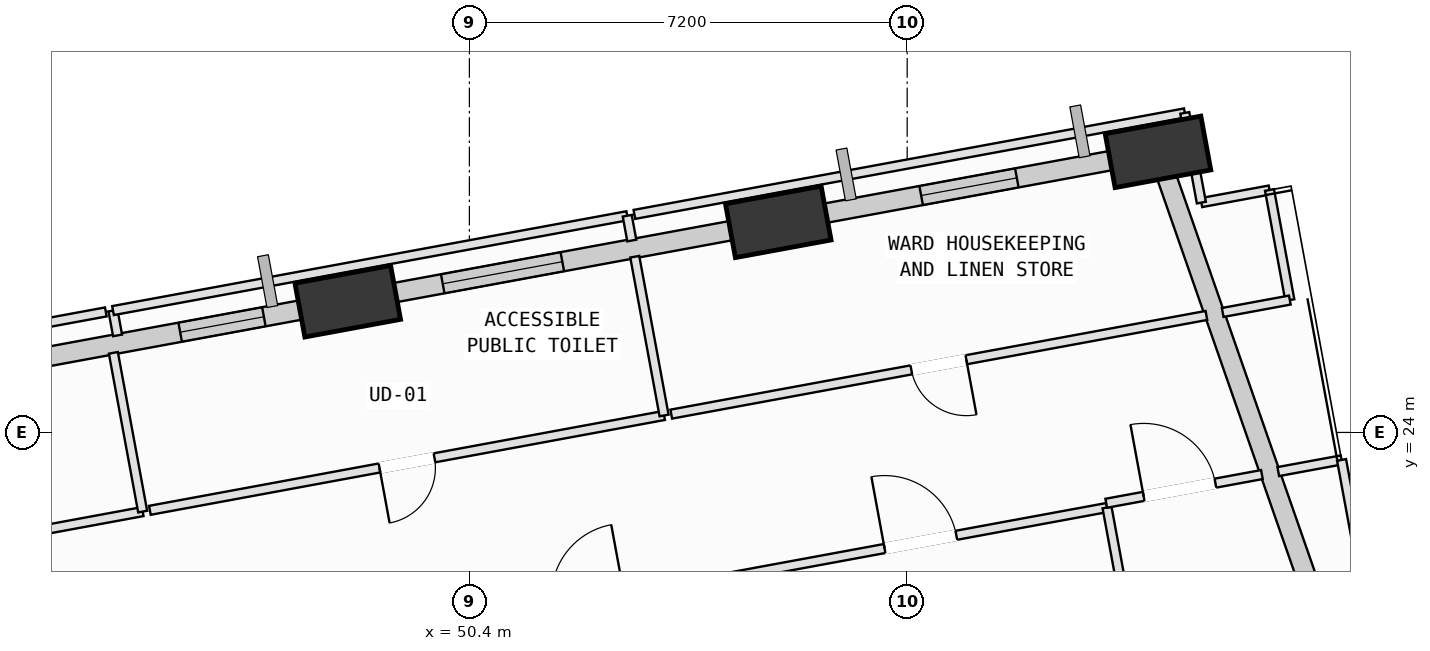
"""IFC4 building model, lengths in metres.
Left out: names, types, materials, properties, quantities, classifications, styles, units other than length and angle.
Written with IfcOpenShell. Run it as: python <this file> out.ifc"""

import sys

from ifc_helpers import new_model, si_unit, direction, frame, frame_2d, origin, origin_2d, place, context, subcontext, project, spatial, rectangle, extrude, element, fill, save


model = new_model("IFC4")
c1 = context("Model", 3, precision=1e-05, world=origin(), true_north=direction((0.0, 1.0)))
c2 = subcontext(c1, "Body", "Model", "MODEL_VIEW")
j1 = project(units=[si_unit("LENGTHUNIT", "METRE"), si_unit("PLANEANGLEUNIT", "RADIAN")], contexts=[c1])
p1 = place(None, origin())
s1 = spatial("IfcSite", under=j1, at=p1, CompositionType="ELEMENT")
p2 = place(p1, origin())
s2 = spatial("IfcBuilding", under=s1, at=p2, CompositionType="ELEMENT")
p3 = place(p2, frame((0.0, 0.0, 67.0)))
s3 = spatial("IfcBuildingStorey", under=s2, at=p3, CompositionType="ELEMENT", Elevation=67.0)
p4 = place(p3, frame((61.725, 28.615, 0.002), z_axis=(-0.0166839767, 0.115635125786, 0.993151631226), x_axis=(-0.947610989873, -0.31872301887, 0.021190778971)))
e1 = element("IfcColumn", 1, at=p4, inside=s3, PredefinedType="COLUMN", context=c2, shape_type="SweptSolid", body=[
    extrude(rectangle(XDim=1.6, YDim=0.9, at=origin_2d()), origin(), (0.0, 0.0, 1.0), 4.024),
])
p5 = place(p3, frame((55.48, 27.463, 0.002), z_axis=(-0.01174096619, 0.090216854196, 0.995852935394), x_axis=(-0.951879637857, -0.306027551893, 0.016501288293)))
e2 = element("IfcColumn", 2, at=p5, inside=s3, PredefinedType="COLUMN", context=c2, shape_type="SweptSolid", body=[
    extrude(rectangle(XDim=1.6, YDim=0.9, at=origin_2d()), origin(), (0.0, 0.0, 1.0), 4.013),
])
p6 = place(p3, frame((48.399, 26.157, 0.002), z_axis=(-0.006158157551, 0.061154772509, 0.998109298071), x_axis=(-0.960327160193, -0.278652944125, 0.011148189357)))
e3 = element("IfcColumn", 3, at=p6, inside=s3, PredefinedType="COLUMN", context=c2, shape_type="SweptSolid", body=[
    extrude(rectangle(XDim=1.6, YDim=0.9, at=origin_2d()), origin(), (0.0, 0.0, 1.0), 4.004),
])
p7 = place(p3, frame((61.848, 28.26, 0.0), z_axis=(0.0, 0.0, 1.0), x_axis=(0.329546090906, -0.944139488618, 0.0)))
e4 = element("IfcWall", 4, at=p7, inside=s3, PredefinedType="SOLIDWALL", context=c2, shape_type="SweptSolid", body=[
    extrude(rectangle(XDim=8.614, YDim=0.32, at=frame_2d((4.307, 0.0))), origin(), (0.0, 0.0, 1.0), 3.165),
])
p8 = place(p3, frame((56.06, 27.57, 0.0), z_axis=(0.0, 0.0, 1.0), x_axis=(0.983413832145, 0.181375948644, 0.0)))
e5 = element("IfcWall", 5, at=p8, inside=s3, PredefinedType="SOLIDWALL", context=c2, shape_type="SweptSolid", body=[
    extrude(rectangle(XDim=5.209, YDim=0.32, at=frame_2d((2.604, 0.0))), origin(), (0.0, 0.0, 1.0), 3.165),
])
p9 = place(p8, frame((1.8, 0.0, 0.75)))
e6 = element("IfcOpeningElement", 6, at=p9, cuts=e5, PredefinedType="OPENING", context=c2, shape_type="SweptSolid", body=[
    extrude(rectangle(XDim=1.6, YDim=1.95, at=frame_2d((0.8, 0.975))), frame((0.0, 0.17, 0.0), z_axis=(0.0, -1.0, 0.0), x_axis=(1.0, 0.0, 0.0)), (0.0, 0.0, 1.0), 0.34),
])
p10 = place(p3, frame((48.995, 26.267, 0.0), z_axis=(0.0, 0.0, 1.0), x_axis=(0.983410218869, 0.1813955386, 0.0)))
e7 = element("IfcWall", 7, at=p10, inside=s3, PredefinedType="SOLIDWALL", context=c2, shape_type="SweptSolid", body=[
    extrude(rectangle(XDim=6.024, YDim=0.32, at=frame_2d((3.012, 0.0))), origin(), (0.0, 0.0, 1.0), 3.165),
])
p11 = place(p10, frame((0.983, 0.0, 0.75)))
e8 = element("IfcOpeningElement", 8, at=p11, cuts=e7, PredefinedType="OPENING", context=c2, shape_type="SweptSolid", body=[
    extrude(rectangle(XDim=2.0, YDim=1.95, at=frame_2d((1.0, 0.975))), frame((0.0, 0.17, 0.0), z_axis=(0.0, -1.0, 0.0), x_axis=(1.0, 0.0, 0.0)), (0.0, 0.0, 1.0), 0.34),
])
p12 = place(p3, frame((41.924, 24.962, 0.0), z_axis=(0.0, 0.0, 1.0), x_axis=(0.983415582056, 0.181366460431, 0.0)))
e9 = element("IfcWall", 9, at=p12, inside=s3, PredefinedType="SOLIDWALL", context=c2, shape_type="SweptSolid", body=[
    extrude(rectangle(XDim=6.0, YDim=0.32, at=frame_2d((3.0, 0.0))), origin(), (0.0, 0.0, 1.0), 3.165),
])
p13 = place(p12, frame((3.782, 0.0, 0.75)))
e10 = element("IfcOpeningElement", 10, at=p13, cuts=e9, PredefinedType="OPENING", context=c2, shape_type="SweptSolid", body=[
    extrude(rectangle(XDim=1.4, YDim=1.85, at=frame_2d((0.7, 0.925))), frame((0.0, 0.17, 0.0), z_axis=(0.0, -1.0, 0.0), x_axis=(1.0, 0.0, 0.0)), (0.0, 0.0, 1.0), 0.34),
])
p14 = place(p3, frame((54.75, 21.634, 0.0), z_axis=(0.0, 0.0, 1.0), x_axis=(0.983442731357, 0.181219188115, 0.0)))
e11 = element("IfcWall", 11, at=p14, inside=s3, PredefinedType="PARTITIONING", context=c2, shape_type="SweptSolid", body=[
    extrude(rectangle(XDim=6.24, YDim=0.15, at=frame_2d((3.12, 0.0))), origin(), (0.0, 0.0, 1.0), 3.78),
])
p15 = place(p14, frame((2.52, 0.0, 0.0)))
e12 = element("IfcOpeningElement", 12, at=p15, cuts=e11, PredefinedType="OPENING", context=c2, shape_type="SweptSolid", body=[
    extrude(rectangle(XDim=1.2, YDim=2.15, at=frame_2d((0.6, 1.075))), frame((0.0, 0.085, 0.0), z_axis=(0.0, -1.0, 0.0), x_axis=(1.0, 0.0, 0.0)), (0.0, 0.0, 1.0), 0.17),
])
p16 = place(p3, frame((60.887, 22.765, 0.0), z_axis=(0.0, 0.0, 1.0), x_axis=(0.181328083702, -0.983422658912, 0.0)))
e13 = element("IfcWall", 13, at=p16, inside=s3, PredefinedType="PARTITIONING", context=c2, shape_type="SweptSolid", body=[
    extrude(rectangle(XDim=15.529, YDim=0.15, at=frame_2d((7.765, 0.0))), origin(), (0.0, 0.0, 1.0), 3.78),
])
p17 = place(p3, frame((45.027, 22.698, 0.0), z_axis=(0.0, 0.0, 1.0), x_axis=(-0.983411242351, -0.181389989847, 0.0)))
e14 = element("IfcWall", 14, at=p17, inside=s3, PredefinedType="PARTITIONING", context=c2, shape_type="SweptSolid", body=[
    extrude(rectangle(XDim=8.165, YDim=0.15, at=frame_2d((4.082, 0.0))), origin(), (0.0, 0.0, 1.0), 3.78),
])
p18 = place(p17, frame((3.482, 0.0, 0.0)))
e15 = element("IfcOpeningElement", 15, at=p18, cuts=e14, PredefinedType="OPENING", context=c2, shape_type="SweptSolid", body=[
    extrude(rectangle(XDim=1.2, YDim=2.15, at=frame_2d((0.6, 1.075))), frame((0.0, 0.085, 0.0), z_axis=(0.0, -1.0, 0.0), x_axis=(1.0, 0.0, 0.0)), (0.0, 0.0, 1.0), 0.17),
])
p19 = place(p3, frame((36.392, 24.502, 0.0), z_axis=(0.0, 0.0, 1.0), x_axis=(0.983431589645, 0.181279641684, 0.0)))
e16 = element("IfcWall", 16, at=p19, inside=s3, PredefinedType="PARTITIONING", context=c2, shape_type="SweptSolid", body=[
    extrude(rectangle(XDim=8.164, YDim=0.15, at=frame_2d((4.082, 0.0))), origin(), (0.0, 0.0, 1.0), 3.165),
])
p20 = place(p3, frame((44.545, 25.309, 0.0), z_axis=(0.0, 0.0, 1.0), x_axis=(0.181595357351, -0.983373340186, 0.0)))
e17 = element("IfcWall", 17, at=p20, inside=s3, PredefinedType="PARTITIONING", context=c2, shape_type="SweptSolid", body=[
    extrude(rectangle(XDim=2.655, YDim=0.15, at=frame_2d((1.328, 0.0))), origin(), (0.0, 0.0, 1.0), 3.78),
])
p21 = place(p3, frame((53.602, 24.279, 0.0), z_axis=(0.0, 0.0, 1.0), x_axis=(-0.983407902238, -0.181408097439, 0.0)))
e18 = element("IfcWall", 18, at=p21, inside=s3, PredefinedType="PARTITIONING", context=c2, shape_type="SweptSolid", body=[
    extrude(rectangle(XDim=8.6, YDim=0.15, at=frame_2d((4.3, 0.0))), origin(), (0.0, 0.0, 1.0), 3.78),
])
p22 = place(p21, frame((3.84, 0.0, 0.0)))
e19 = element("IfcOpeningElement", 19, at=p22, cuts=e18, PredefinedType="OPENING", context=c2, shape_type="SweptSolid", body=[
    extrude(rectangle(XDim=0.92, YDim=2.1, at=frame_2d((0.46, 1.05))), frame((0.0, 0.085, 0.0), z_axis=(0.0, -1.0, 0.0), x_axis=(1.0, 0.0, 0.0)), (0.0, 0.0, 1.0), 0.17),
])
p23 = place(p3, frame((44.614, 25.596, 0.0), z_axis=(0.0, 0.0, 1.0), x_axis=(-0.180698000463, 0.983538627929, 0.0)))
e20 = element("IfcWall", 20, at=p23, inside=s3, PredefinedType="PARTITIONING", context=c2, shape_type="SweptSolid", body=[
    extrude(rectangle(XDim=0.415, YDim=0.15, at=frame_2d((0.208, 0.0))), origin(), (0.0, 0.0, 1.0), 3.78),
])
p24 = place(p3, frame((44.539, 26.004, 0.0), z_axis=(0.0, 0.0, 1.0), x_axis=(0.983407902238, 0.181408097439, 0.0)))
e21 = element("IfcWall", 21, at=p24, inside=s3, PredefinedType="PARTITIONING", context=c2, shape_type="SweptSolid", body=[
    extrude(rectangle(XDim=8.6, YDim=0.15, at=frame_2d((4.3, 0.0))), origin(), (0.0, 0.0, 1.0), 3.165),
])
p25 = place(p3, frame((52.996, 27.564, 0.0), z_axis=(0.0, 0.0, 1.0), x_axis=(0.180698000463, -0.983538627929, 0.0)))
e22 = element("IfcWall", 22, at=p25, inside=s3, PredefinedType="PARTITIONING", context=c2, shape_type="SweptSolid", body=[
    extrude(rectangle(XDim=0.415, YDim=0.15, at=frame_2d((0.208, 0.0))), origin(), (0.0, 0.0, 1.0), 3.78),
])
p26 = place(p3, frame((53.12, 26.89, 0.0), z_axis=(0.0, 0.0, 1.0), x_axis=(0.181522853733, -0.983386726356, 0.0)))
e23 = element("IfcWall", 23, at=p26, inside=s3, PredefinedType="PARTITIONING", context=c2, shape_type="SweptSolid", body=[
    extrude(rectangle(XDim=2.655, YDim=0.15, at=frame_2d((1.328, 0.0))), origin(), (0.0, 0.0, 1.0), 3.78),
])
p27 = place(p3, frame((62.438, 27.78, 0.0), z_axis=(0.0, 0.0, 1.0), x_axis=(0.983372768072, 0.181598455428, 0.0)))
e24 = element("IfcWall", 24, at=p27, inside=s3, PredefinedType="PARTITIONING", context=c2, shape_type="SweptSolid", body=[
    extrude(rectangle(XDim=1.14, YDim=0.15, at=frame_2d((0.57, 0.0))), origin(), (0.0, 0.0, 1.0), 3.78),
])
p28 = place(p3, frame((63.559, 27.987, 0.0), z_axis=(0.0, 0.0, 1.0), x_axis=(0.181452756796, -0.98339966293, 0.0)))
e25 = element("IfcWall", 25, at=p28, inside=s3, PredefinedType="PARTITIONING", context=c2, shape_type="SweptSolid", body=[
    extrude(rectangle(XDim=1.841, YDim=0.15, at=frame_2d((0.92, 0.0))), origin(), (0.0, 0.0, 1.0), 3.78),
])
p29 = place(p3, frame((63.893, 26.177, 0.0), z_axis=(0.0, 0.0, 1.0), x_axis=(-0.983336757106, -0.181793350053, 0.0)))
e26 = element("IfcWall", 26, at=p29, inside=s3, PredefinedType="PARTITIONING", context=c2, shape_type="SweptSolid", body=[
    extrude(rectangle(XDim=1.123, YDim=0.15, at=frame_2d((0.562, 0.0))), origin(), (0.0, 0.0, 1.0), 3.78),
])
p30 = place(p3, frame((62.521, 25.924, 0.0), z_axis=(0.0, 0.0, 1.0), x_axis=(-0.983417228319, -0.181357533742, 0.0)))
e27 = element("IfcWall", 27, at=p30, inside=s3, PredefinedType="PARTITIONING", context=c2, shape_type="SweptSolid", body=[
    extrude(rectangle(XDim=8.949, YDim=0.15, at=frame_2d((4.475, 0.0))), origin(), (0.0, 0.0, 1.0), 3.78),
])
p31 = place(p30, frame((4.015, 0.0, 0.0)))
e28 = element("IfcOpeningElement", 28, at=p31, cuts=e27, PredefinedType="OPENING", context=c2, shape_type="SweptSolid", body=[
    extrude(rectangle(XDim=0.92, YDim=2.1, at=frame_2d((0.46, 1.05))), frame((0.0, 0.085, 0.0), z_axis=(0.0, -1.0, 0.0), x_axis=(1.0, 0.0, 0.0)), (0.0, 0.0, 1.0), 0.17),
])
p32 = place(p3, frame((53.114, 27.586, 0.0), z_axis=(0.0, 0.0, 1.0), x_axis=(0.983424698389, 0.181317022364, 0.0)))
e29 = element("IfcWall", 29, at=p32, inside=s3, PredefinedType="PARTITIONING", context=c2, shape_type="SweptSolid", body=[
    extrude(rectangle(XDim=9.205, YDim=0.15, at=frame_2d((4.602, 0.0))), origin(), (0.0, 0.0, 1.0), 3.165),
])
p33 = place(p3, frame((62.166, 29.255, 0.0), z_axis=(0.0, 0.0, 1.0), x_axis=(0.181348877765, -0.983418824577, 0.0)))
e30 = element("IfcWall", 30, at=p33, inside=s3, PredefinedType="PARTITIONING", context=c2, shape_type="SweptSolid", body=[
    extrude(rectangle(XDim=1.5, YDim=0.15, at=frame_2d((0.75, 0.0))), origin(), (0.0, 0.0, 1.0), 3.165),
])
p34 = place(p3, frame((60.874, 22.835, 0.0), z_axis=(0.0, 0.0, 1.0), x_axis=(0.98343031554, 0.181286553494, 0.0)))
e31 = element("IfcWall", 31, at=p34, inside=s3, PredefinedType="PARTITIONING", context=c2, shape_type="SweptSolid", body=[
    extrude(rectangle(XDim=2.603, YDim=0.15, at=frame_2d((1.302, 0.0))), origin(), (0.0, 0.0, 1.0), 3.78),
])
p35 = place(p34, frame((0.626, 0.0, 0.0)))
e32 = element("IfcOpeningElement", 32, at=p35, cuts=e31, PredefinedType="OPENING", context=c2, shape_type="SweptSolid", body=[
    extrude(rectangle(XDim=1.2, YDim=2.15, at=frame_2d((0.6, 1.075))), frame((0.0, 0.085, 0.0), z_axis=(0.0, -1.0, 0.0), x_axis=(1.0, 0.0, 0.0)), (0.0, 0.0, 1.0), 0.17),
])
p36 = place(p3, frame((63.703, 23.356, 0.0), z_axis=(0.0, 0.0, 1.0), x_axis=(0.983390414143, 0.18150287428, 0.0)))
e33 = element("IfcWall", 33, at=p36, inside=s3, PredefinedType="PARTITIONING", context=c2, shape_type="SweptSolid", body=[
    extrude(rectangle(XDim=1.059, YDim=0.15, at=frame_2d((0.529, 0.0))), origin(), (0.0, 0.0, 1.0), 3.78),
])
p37 = place(p3, frame((64.744, 23.548, 0.0), z_axis=(0.0, 0.0, 1.0), x_axis=(0.18134422217, -0.983419683088, 0.0)))
e34 = element("IfcWall", 34, at=p37, inside=s3, PredefinedType="PARTITIONING", context=c2, shape_type="SweptSolid", body=[
    extrude(rectangle(XDim=12.92, YDim=0.15, at=frame_2d((6.46, 0.0))), origin(), (0.0, 0.0, 1.0), 3.165),
])
p38 = place(p9, origin())
e35 = element("IfcWindow", 35, at=p38, inside=s3, PartitioningType="SINGLE_PANEL", PredefinedType="WINDOW", context=c2, shape_type="SweptSolid", body=[
    extrude(rectangle(XDim=1.6, YDim=1.95, at=frame_2d((0.8, 0.975))), frame((0.0, 0.03, 0.0), z_axis=(0.0, -1.0, 0.0), x_axis=(1.0, 0.0, 0.0)), (0.0, 0.0, 1.0), 0.06),
])
fill(e6, e35)
p39 = place(p11, origin())
e36 = element("IfcWindow", 36, at=p39, inside=s3, PartitioningType="SINGLE_PANEL", PredefinedType="WINDOW", context=c2, shape_type="SweptSolid", body=[
    extrude(rectangle(XDim=2.0, YDim=1.95, at=frame_2d((1.0, 0.975))), frame((0.0, 0.03, 0.0), z_axis=(0.0, -1.0, 0.0), x_axis=(1.0, 0.0, 0.0)), (0.0, 0.0, 1.0), 0.06),
])
fill(e8, e36)
p40 = place(p13, origin())
e37 = element("IfcWindow", 37, at=p40, inside=s3, PartitioningType="SINGLE_PANEL", PredefinedType="WINDOW", context=c2, shape_type="SweptSolid", body=[
    extrude(rectangle(XDim=1.4, YDim=1.85, at=frame_2d((0.7, 0.925))), frame((0.0, 0.03, 0.0), z_axis=(0.0, -1.0, 0.0), x_axis=(1.0, 0.0, 0.0)), (0.0, 0.0, 1.0), 0.06),
])
fill(e10, e37)
p41 = place(p15, origin())
e38 = element("IfcDoor", 38, at=p41, inside=s3, OperationType="SINGLE_SWING_LEFT", PredefinedType="DOOR", context=c2, shape_type="SweptSolid", body=[
    extrude(rectangle(XDim=1.2, YDim=2.15, at=frame_2d((0.6, 1.075))), frame((0.0, 0.025, 0.0), z_axis=(0.0, -1.0, 0.0), x_axis=(1.0, 0.0, 0.0)), (0.0, 0.0, 1.0), 0.05),
])
fill(e12, e38)
p42 = place(p22, origin())
e39 = element("IfcDoor", 39, at=p42, inside=s3, OperationType="SINGLE_SWING_RIGHT", PredefinedType="DOOR", context=c2, shape_type="SweptSolid", body=[
    extrude(rectangle(XDim=0.92, YDim=2.1, at=frame_2d((0.46, 1.05))), frame((0.0, 0.025, 0.0), z_axis=(0.0, -1.0, 0.0), x_axis=(1.0, 0.0, 0.0)), (0.0, 0.0, 1.0), 0.05),
])
fill(e19, e39)
p43 = place(p31, origin())
e40 = element("IfcDoor", 40, at=p43, inside=s3, OperationType="SINGLE_SWING_LEFT", PredefinedType="DOOR", context=c2, shape_type="SweptSolid", body=[
    extrude(rectangle(XDim=0.92, YDim=2.1, at=frame_2d((0.46, 1.05))), frame((0.0, 0.025, 0.0), z_axis=(0.0, -1.0, 0.0), x_axis=(1.0, 0.0, 0.0)), (0.0, 0.0, 1.0), 0.05),
])
fill(e28, e40)
p44 = place(p35, origin())
e41 = element("IfcDoor", 41, at=p44, inside=s3, OperationType="SINGLE_SWING_LEFT", PredefinedType="DOOR", context=c2, shape_type="SweptSolid", body=[
    extrude(rectangle(XDim=1.2, YDim=2.15, at=frame_2d((0.6, 1.075))), frame((0.0, 0.025, 0.0), z_axis=(0.0, -1.0, 0.0), x_axis=(1.0, 0.0, 0.0)), (0.0, 0.0, 1.0), 0.05),
])
fill(e32, e41)
save(model, sys.argv[1])
